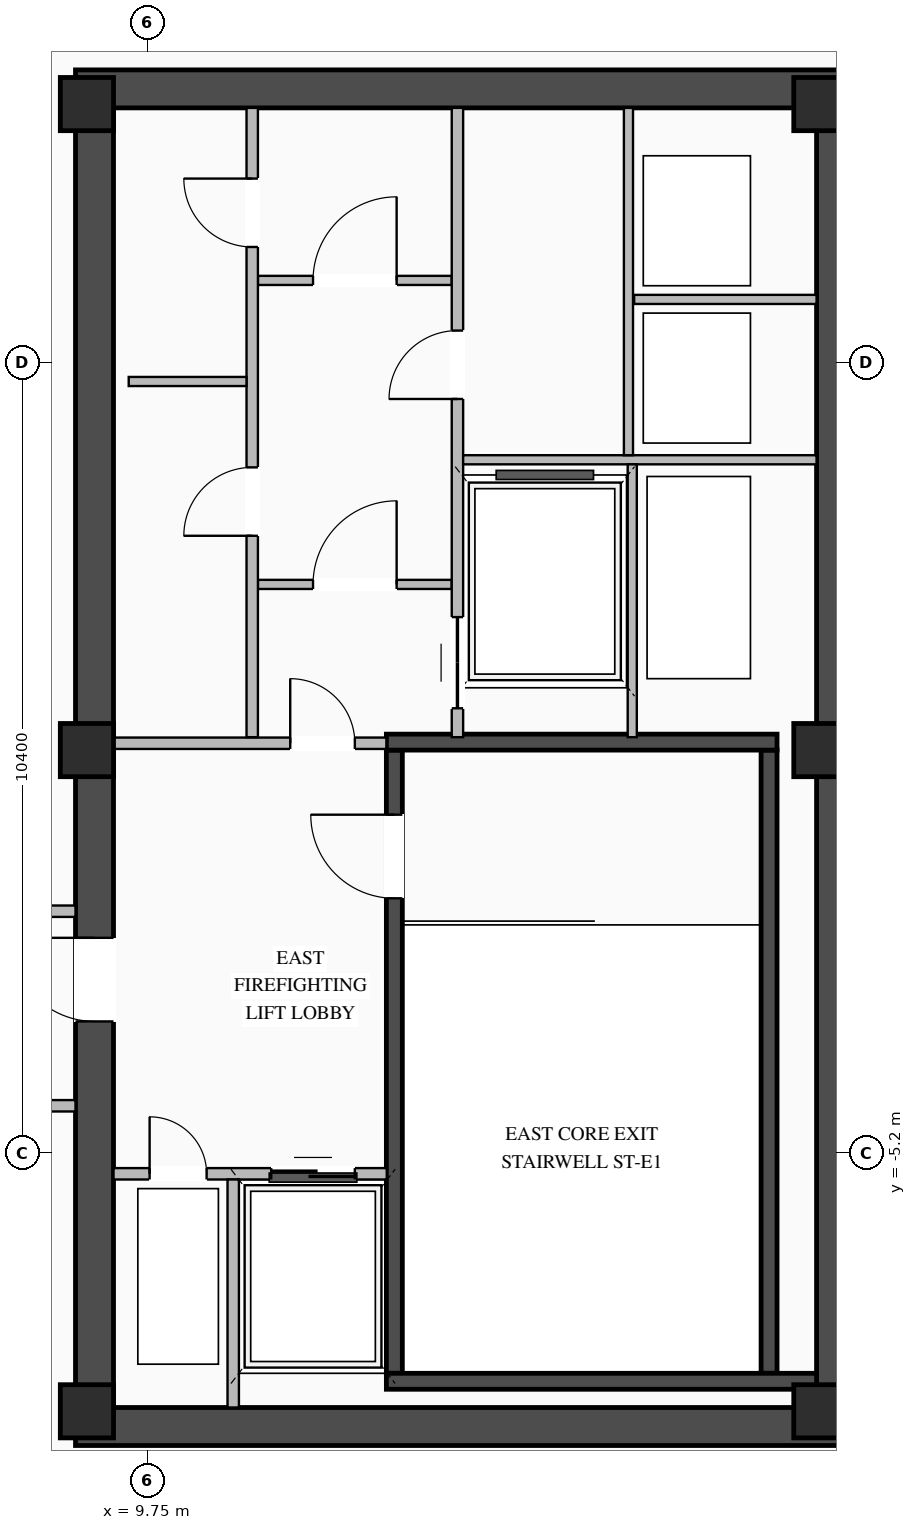
"""IFC4 building model, lengths in metres.
Left out: names, types, materials, properties, quantities, classifications, styles, units other than length and angle.
Written with IfcOpenShell. Run it as: python <this file> out.ifc"""

import sys

from ifc_helpers import new_model, si_unit, direction, frame, frame_2d, origin, origin_2d, place, context, subcontext, project, spatial, rectangle, extrude, element, fill, save


model = new_model("IFC4")
c1 = context("Model", 3, precision=1e-05, world=origin(), true_north=direction((0.0, 1.0)))
c2 = subcontext(c1, "Body", "Model", "MODEL_VIEW")
j1 = project(units=[si_unit("LENGTHUNIT", "METRE"), si_unit("PLANEANGLEUNIT", "RADIAN")], contexts=[c1])
p1 = place(None, origin())
s1 = spatial("IfcSite", under=j1, at=p1, CompositionType="ELEMENT")
p2 = place(p1, origin())
s2 = spatial("IfcBuilding", under=s1, at=p2, CompositionType="ELEMENT")
p3 = place(p2, frame((0.0, 0.0, 308.55)))
s3 = spatial("IfcBuildingStorey", under=s2, at=p3, CompositionType="ELEMENT", Elevation=308.55)
for number, where, z_axis, x_axis in (
    (1, (8.8, -8.8, 0.0), (0.0, 0.0, 1.0), (1.0, 0.0, 0.0)),
    (2, (8.8, 8.8, 0.0), (0.0, 0.0, 1.0), (1.0, 0.0, 0.0)),
):
    element("IfcWall", number, at=place(p3, frame(where, z_axis=z_axis, x_axis=x_axis)), inside=s3, PredefinedType="SHEAR", context=c2, shape_type="SweptSolid", body=[
        extrude(rectangle(XDim=10.25, YDim=0.5, at=frame_2d((5.125, 0.0))), origin(), (0.0, 0.0, 1.0), 3.71),
    ])
p4 = place(p3, frame((9.05, -8.55, 0.0), z_axis=(0.0, 0.0, 1.0), x_axis=(0.0, 1.0, 0.0)))
e3 = element("IfcWall", 3, at=p4, inside=s3, PredefinedType="SHEAR", context=c2, shape_type="SweptSolid", body=[
    extrude(rectangle(XDim=17.1, YDim=0.5, at=frame_2d((8.55, 0.0))), origin(), (0.0, 0.0, 1.0), 3.71),
])
p5 = place(p4, frame((5.08, 0.0, 0.0)))
e4 = element("IfcOpeningElement", 4, at=p5, cuts=e3, PredefinedType="OPENING", context=c2, shape_type="SweptSolid", body=[
    extrude(rectangle(XDim=1.1, YDim=2.08, at=frame_2d((0.55, 1.04))), frame((0.0, 0.26, 0.0), z_axis=(0.0, -1.0, 0.0), x_axis=(1.0, 0.0, 0.0)), (0.0, 0.0, 1.0), 0.52),
])
p6 = place(p3, frame((18.8, -8.55, 0.0), z_axis=(0.0, 0.0, 1.0), x_axis=(0.0, 1.0, 0.0)))
e5 = element("IfcWall", 5, at=p6, inside=s3, PredefinedType="SHEAR", context=c2, shape_type="SweptSolid", body=[
    extrude(rectangle(XDim=17.1, YDim=0.5, at=frame_2d((8.55, 0.0))), origin(), (0.0, 0.0, 1.0), 3.71),
])
p7 = place(p3, frame((12.995, -8.1, 0.0), z_axis=(0.0, 0.0, 1.0), x_axis=(0.0, 1.0, 0.0)))
e6 = element("IfcWall", 6, at=p7, inside=s3, PredefinedType="SHEAR", context=c2, shape_type="SweptSolid", body=[
    extrude(rectangle(XDim=8.2, YDim=0.21, at=frame_2d((4.1, 0.0))), origin(), (0.0, 0.0, 1.0), 3.71),
])
p8 = place(p7, frame((6.25, 0.0, 0.0)))
e7 = element("IfcOpeningElement", 7, at=p8, cuts=e6, PredefinedType="OPENING", context=c2, shape_type="SweptSolid", body=[
    extrude(rectangle(XDim=1.1, YDim=2.15, at=frame_2d((0.55, 1.075))), frame((0.0, 0.115, 0.0), z_axis=(0.0, -1.0, 0.0), x_axis=(1.0, 0.0, 0.0)), (0.0, 0.0, 1.0), 0.23),
])
p9 = place(p3, frame((17.925, -8.1, 0.0), z_axis=(0.0, 0.0, 1.0), x_axis=(0.0, 1.0, 0.0)))
e8 = element("IfcWall", 8, at=p9, inside=s3, PredefinedType="SHEAR", context=c2, shape_type="SweptSolid", body=[
    extrude(rectangle(XDim=8.2, YDim=0.21, at=frame_2d((4.1, 0.0))), origin(), (0.0, 0.0, 1.0), 3.71),
])
p10 = place(p3, frame((12.89, -8.205, 0.0), z_axis=(0.0, 0.0, 1.0), x_axis=(1.0, 0.0, 0.0)))
e9 = element("IfcWall", 9, at=p10, inside=s3, PredefinedType="SHEAR", context=c2, shape_type="SweptSolid", body=[
    extrude(rectangle(XDim=5.66, YDim=0.21, at=frame_2d((2.83, 0.0))), origin(), (0.0, 0.0, 1.0), 3.71),
])
p11 = place(p3, frame((18.03, 0.205, 0.0), z_axis=(0.0, 0.0, 1.0), x_axis=(-1.0, 0.0, 0.0)))
e10 = element("IfcWall", 10, at=p11, inside=s3, PredefinedType="SHEAR", context=c2, shape_type="SweptSolid", body=[
    extrude(rectangle(XDim=5.14, YDim=0.21, at=frame_2d((2.57, 0.0))), origin(), (0.0, 0.0, 1.0), 3.71),
])
for number, where, z_axis, x_axis in (
    (11, (8.95, -8.6, 0.0), (0.0, 0.0, 1.0), (1.0, 0.0, 0.0)),
    (12, (8.95, 0.1, 0.0), (0.0, 0.0, 1.0), (1.0, 0.0, 0.0)),
    (13, (8.95, 8.6, 0.0), (0.0, 0.0, 1.0), (1.0, 0.0, 0.0)),
    (14, (18.6, -8.6, 0.0), (0.0, 0.0, 1.0), (1.0, 0.0, 0.0)),
    (15, (18.6, 0.1, 0.0), (0.0, 0.0, 1.0), (1.0, 0.0, 0.0)),
    (16, (18.6, 8.6, 0.0), (0.0, 0.0, 1.0), (1.0, 0.0, 0.0)),
):
    element("IfcColumn", number, at=place(p3, frame(where, z_axis=z_axis, x_axis=x_axis)), inside=s3, PredefinedType="COLUMN", context=c2, shape_type="SweptSolid", body=[
        extrude(rectangle(XDim=0.7, YDim=0.7, at=origin_2d()), origin(), (0.0, 0.0, 1.0), 3.95),
    ])
p12 = place(p3, frame((9.3, -5.475, 0.0), z_axis=(0.0, 0.0, 1.0), x_axis=(1.0, 0.0, 0.0)))
e17 = element("IfcWall", 17, at=p12, inside=s3, PredefinedType="STANDARD", context=c2, shape_type="SweptSolid", body=[
    extrude(rectangle(XDim=3.595, YDim=0.15, at=frame_2d((1.797, 0.0))), origin(), (0.0, 0.0, 1.0), 3.69),
])
p13 = place(p12, frame((2.075, 0.0, 0.0)))
e18 = element("IfcOpeningElement", 18, at=p13, cuts=e17, PredefinedType="OPENING", context=c2, shape_type="SweptSolid", body=[
    extrude(rectangle(XDim=1.1, YDim=2.15, at=frame_2d((0.55, 1.075))), frame((0.0, 0.085, 0.0), z_axis=(0.0, -1.0, 0.0), x_axis=(1.0, 0.0, 0.0)), (0.0, 0.0, 1.0), 0.17),
])
p14 = place(p12, frame((0.475, 0.0, 0.0)))
e19 = element("IfcOpeningElement", 19, at=p14, cuts=e17, PredefinedType="OPENING", context=c2, shape_type="SweptSolid", body=[
    extrude(rectangle(XDim=0.75, YDim=2.05, at=frame_2d((0.375, 1.025))), frame((0.0, 0.085, 0.0), z_axis=(0.0, -1.0, 0.0), x_axis=(1.0, 0.0, 0.0)), (0.0, 0.0, 1.0), 0.17),
])
p15 = place(p3, frame((10.875, -8.55, 0.0), z_axis=(0.0, 0.0, 1.0), x_axis=(0.0, 1.0, 0.0)))
e20 = element("IfcWall", 20, at=p15, inside=s3, PredefinedType="STANDARD", context=c2, shape_type="SweptSolid", body=[
    extrude(rectangle(XDim=3.0, YDim=0.15, at=frame_2d((1.5, 0.0))), origin(), (0.0, 0.0, 1.0), 3.69),
])
p16 = place(p3, frame((9.3, 0.19, 0.0), z_axis=(0.0, 0.0, 1.0), x_axis=(1.0, 0.0, 0.0)))
e21 = element("IfcWall", 21, at=p16, inside=s3, PredefinedType="STANDARD", context=c2, shape_type="SweptSolid", body=[
    extrude(rectangle(XDim=3.59, YDim=0.15, at=frame_2d((1.795, 0.0))), origin(), (0.0, 0.0, 1.0), 3.185),
])
p17 = place(p16, frame((2.325, 0.0, 0.0)))
e22 = element("IfcOpeningElement", 22, at=p17, cuts=e21, PredefinedType="OPENING", context=c2, shape_type="SweptSolid", body=[
    extrude(rectangle(XDim=0.85, YDim=2.04, at=frame_2d((0.425, 1.02))), frame((0.0, 0.085, 0.0), z_axis=(0.0, -1.0, 0.0), x_axis=(1.0, 0.0, 0.0)), (0.0, 0.0, 1.0), 0.17),
])
p18 = place(p3, frame((11.2, 2.28, 0.0), z_axis=(0.0, 0.0, 1.0), x_axis=(1.0, 0.0, 0.0)))
e23 = element("IfcWall", 23, at=p18, inside=s3, PredefinedType="STANDARD", context=c2, shape_type="SweptSolid", body=[
    extrude(rectangle(XDim=2.55, YDim=0.12, at=frame_2d((1.275, 0.0))), origin(), (0.0, 0.0, 1.0), 3.69),
])
p19 = place(p18, frame((0.725, 0.0, 0.0)))
e24 = element("IfcOpeningElement", 24, at=p19, cuts=e23, PredefinedType="OPENING", context=c2, shape_type="SweptSolid", body=[
    extrude(rectangle(XDim=1.1, YDim=2.1, at=frame_2d((0.55, 1.05))), frame((0.0, 0.07, 0.0), z_axis=(0.0, -1.0, 0.0), x_axis=(1.0, 0.0, 0.0)), (0.0, 0.0, 1.0), 0.14),
])
p20 = place(p3, frame((11.2, 6.28, 0.0), z_axis=(0.0, 0.0, 1.0), x_axis=(1.0, 0.0, 0.0)))
e25 = element("IfcWall", 25, at=p20, inside=s3, PredefinedType="STANDARD", context=c2, shape_type="SweptSolid", body=[
    extrude(rectangle(XDim=2.55, YDim=0.12, at=frame_2d((1.275, 0.0))), origin(), (0.0, 0.0, 1.0), 3.69),
])
p21 = place(p20, frame((0.725, 0.0, 0.0)))
e26 = element("IfcOpeningElement", 26, at=p21, cuts=e25, PredefinedType="OPENING", context=c2, shape_type="SweptSolid", body=[
    extrude(rectangle(XDim=1.1, YDim=2.1, at=frame_2d((0.55, 1.05))), frame((0.0, 0.07, 0.0), z_axis=(0.0, -1.0, 0.0), x_axis=(1.0, 0.0, 0.0)), (0.0, 0.0, 1.0), 0.14),
])
p22 = place(p3, frame((11.125, 0.27, 0.0), z_axis=(0.0, 0.0, 1.0), x_axis=(0.0, 1.0, 0.0)))
e27 = element("IfcWall", 27, at=p22, inside=s3, PredefinedType="STANDARD", context=c2, shape_type="SweptSolid", body=[
    extrude(rectangle(XDim=8.28, YDim=0.15, at=frame_2d((4.14, 0.0))), origin(), (0.0, 0.0, 1.0), 3.69),
])
p23 = place(p22, frame((2.65, 0.0, 0.0)))
e28 = element("IfcOpeningElement", 28, at=p23, cuts=e27, PredefinedType="OPENING", context=c2, shape_type="SweptSolid", body=[
    extrude(rectangle(XDim=0.9, YDim=2.05, at=frame_2d((0.45, 1.025))), frame((0.0, 0.085, 0.0), z_axis=(0.0, -1.0, 0.0), x_axis=(1.0, 0.0, 0.0)), (0.0, 0.0, 1.0), 0.17),
])
p24 = place(p22, frame((6.45, 0.0, 0.0)))
e29 = element("IfcOpeningElement", 29, at=p24, cuts=e27, PredefinedType="OPENING", context=c2, shape_type="SweptSolid", body=[
    extrude(rectangle(XDim=0.9, YDim=2.05, at=frame_2d((0.45, 1.025))), frame((0.0, 0.085, 0.0), z_axis=(0.0, -1.0, 0.0), x_axis=(1.0, 0.0, 0.0)), (0.0, 0.0, 1.0), 0.17),
])
p25 = place(p3, frame((9.5, 4.95, 0.0), z_axis=(0.0, 0.0, 1.0), x_axis=(1.0, 0.0, 0.0)))
e30 = element("IfcWall", 30, at=p25, inside=s3, PredefinedType="STANDARD", context=c2, shape_type="SweptSolid", body=[
    extrude(rectangle(XDim=1.55, YDim=0.12, at=frame_2d((0.775, 0.0))), origin(), (0.0, 0.0, 1.0), 3.69),
])
p26 = place(p3, frame((13.825, 0.27, 0.0), z_axis=(0.0, 0.0, 1.0), x_axis=(0.0, 1.0, 0.0)))
e31 = element("IfcWall", 31, at=p26, inside=s3, PredefinedType="STANDARD", context=c2, shape_type="SweptSolid", body=[
    extrude(rectangle(XDim=8.28, YDim=0.15, at=frame_2d((4.14, 0.0))), origin(), (0.0, 0.0, 1.0), 3.69),
])
p27 = place(p26, frame((4.45, 0.0, 0.0)))
e32 = element("IfcOpeningElement", 32, at=p27, cuts=e31, PredefinedType="OPENING", context=c2, shape_type="SweptSolid", body=[
    extrude(rectangle(XDim=0.9, YDim=2.05, at=frame_2d((0.45, 1.025))), frame((0.0, 0.085, 0.0), z_axis=(0.0, -1.0, 0.0), x_axis=(1.0, 0.0, 0.0)), (0.0, 0.0, 1.0), 0.17),
])
p28 = place(p26, frame((0.38, 0.0, 0.0)))
e33 = element("IfcOpeningElement", 33, at=p28, cuts=e31, PredefinedType="OPENING", context=c2, shape_type="SweptSolid", body=[
    extrude(rectangle(XDim=1.2, YDim=2.1, at=frame_2d((0.6, 1.05))), frame((0.0, 0.085, 0.0), z_axis=(0.0, -1.0, 0.0), x_axis=(1.0, 0.0, 0.0)), (0.0, 0.0, 1.0), 0.17),
])
p29 = place(p3, frame((13.9, 3.92, 0.0), z_axis=(0.0, 0.0, 1.0), x_axis=(1.0, 0.0, 0.0)))
e34 = element("IfcWall", 34, at=p29, inside=s3, PredefinedType="STANDARD", context=c2, shape_type="SweptSolid", body=[
    extrude(rectangle(XDim=4.65, YDim=0.12, at=frame_2d((2.325, 0.0))), origin(), (0.0, 0.0, 1.0), 3.69),
])
p30 = place(p3, frame((16.15, 6.03, 0.0), z_axis=(0.0, 0.0, 1.0), x_axis=(1.0, 0.0, 0.0)))
e35 = element("IfcWall", 35, at=p30, inside=s3, PredefinedType="STANDARD", context=c2, shape_type="SweptSolid", body=[
    extrude(rectangle(XDim=2.4, YDim=0.12, at=frame_2d((1.2, 0.0))), origin(), (0.0, 0.0, 1.0), 3.69),
])
p31 = place(p3, frame((16.075, 3.98, 0.0), z_axis=(0.0, 0.0, 1.0), x_axis=(0.0, 1.0, 0.0)))
e36 = element("IfcWall", 36, at=p31, inside=s3, PredefinedType="STANDARD", context=c2, shape_type="SweptSolid", body=[
    extrude(rectangle(XDim=4.57, YDim=0.12, at=frame_2d((2.285, 0.0))), origin(), (0.0, 0.0, 1.0), 3.69),
])
p32 = place(p3, frame((16.125, 0.27, 0.0), z_axis=(0.0, 0.0, 1.0), x_axis=(0.0, 1.0, 0.0)))
e37 = element("IfcWall", 37, at=p32, inside=s3, PredefinedType="STANDARD", context=c2, shape_type="SweptSolid", body=[
    extrude(rectangle(XDim=3.59, YDim=0.12, at=frame_2d((1.795, 0.0))), origin(), (0.0, 0.0, 1.0), 3.69),
])
p33 = place(p3, frame((-8.8, -2.02, 0.0), z_axis=(0.0, 0.0, 1.0), x_axis=(1.0, 0.0, 0.0)))
e38 = element("IfcWall", 38, at=p33, inside=s3, PredefinedType="STANDARD", context=c2, shape_type="SweptSolid", body=[
    extrude(rectangle(XDim=17.6, YDim=0.15, at=frame_2d((8.8, 0.0))), origin(), (0.0, 0.0, 1.0), 3.69),
])
p34 = place(p33, frame((4.6, 0.0, 0.0)))
e39 = element("IfcOpeningElement", 39, at=p34, cuts=e38, PredefinedType="OPENING", context=c2, shape_type="SweptSolid", body=[
    extrude(rectangle(XDim=1.0, YDim=2.02, at=frame_2d((0.5, 1.01))), frame((0.0, 0.085, 0.0), z_axis=(0.0, -1.0, 0.0), x_axis=(1.0, 0.0, 0.0)), (0.0, 0.0, 1.0), 0.17),
])
p35 = place(p33, frame((13.4, 0.0, 0.0)))
e40 = element("IfcOpeningElement", 40, at=p35, cuts=e38, PredefinedType="OPENING", context=c2, shape_type="SweptSolid", body=[
    extrude(rectangle(XDim=1.0, YDim=2.02, at=frame_2d((0.5, 1.01))), frame((0.0, 0.085, 0.0), z_axis=(0.0, -1.0, 0.0), x_axis=(1.0, 0.0, 0.0)), (0.0, 0.0, 1.0), 0.17),
])
p36 = place(p3, frame((-8.8, -4.58, 0.0), z_axis=(0.0, 0.0, 1.0), x_axis=(1.0, 0.0, 0.0)))
e41 = element("IfcWall", 41, at=p36, inside=s3, PredefinedType="STANDARD", context=c2, shape_type="SweptSolid", body=[
    extrude(rectangle(XDim=17.6, YDim=0.15, at=frame_2d((8.8, 0.0))), origin(), (0.0, 0.0, 1.0), 3.69),
])
p37 = place(p36, frame((4.6, 0.0, 0.0)))
e42 = element("IfcOpeningElement", 42, at=p37, cuts=e41, PredefinedType="OPENING", context=c2, shape_type="SweptSolid", body=[
    extrude(rectangle(XDim=1.0, YDim=2.02, at=frame_2d((0.5, 1.01))), frame((0.0, 0.085, 0.0), z_axis=(0.0, -1.0, 0.0), x_axis=(1.0, 0.0, 0.0)), (0.0, 0.0, 1.0), 0.17),
])
p38 = place(p8, origin())
e43 = element("IfcDoor", 43, at=p38, inside=s3, OperationType="SINGLE_SWING_RIGHT", PredefinedType="DOOR", context=c2, shape_type="SweptSolid", body=[
    extrude(rectangle(XDim=1.1, YDim=2.15, at=frame_2d((0.55, 1.075))), frame((0.0, 0.025, 0.0), z_axis=(0.0, -1.0, 0.0), x_axis=(1.0, 0.0, 0.0)), (0.0, 0.0, 1.0), 0.05),
])
fill(e7, e43)
p39 = place(p13, origin())
e44 = element("IfcDoor", 44, at=p39, inside=s3, OperationType="DOUBLE_DOOR_SLIDING", PredefinedType="DOOR", context=c2, shape_type="SweptSolid", body=[
    extrude(rectangle(XDim=1.1, YDim=2.15, at=frame_2d((0.55, 1.075))), frame((0.0, 0.025, 0.0), z_axis=(0.0, -1.0, 0.0), x_axis=(1.0, 0.0, 0.0)), (0.0, 0.0, 1.0), 0.05),
])
fill(e18, e44)
p40 = place(p14, origin())
e45 = element("IfcDoor", 45, at=p40, inside=s3, OperationType="SINGLE_SWING_LEFT", PredefinedType="DOOR", context=c2, shape_type="SweptSolid", body=[
    extrude(rectangle(XDim=0.75, YDim=2.05, at=frame_2d((0.375, 1.025))), frame((0.0, 0.025, 0.0), z_axis=(0.0, -1.0, 0.0), x_axis=(1.0, 0.0, 0.0)), (0.0, 0.0, 1.0), 0.05),
])
fill(e19, e45)
p41 = place(p17, origin())
e46 = element("IfcDoor", 46, at=p41, inside=s3, OperationType="SINGLE_SWING_LEFT", PredefinedType="DOOR", context=c2, shape_type="SweptSolid", body=[
    extrude(rectangle(XDim=0.85, YDim=2.04, at=frame_2d((0.425, 1.02))), frame((0.0, 0.025, 0.0), z_axis=(0.0, -1.0, 0.0), x_axis=(1.0, 0.0, 0.0)), (0.0, 0.0, 1.0), 0.05),
])
fill(e22, e46)
p42 = place(p5, origin())
e47 = element("IfcDoor", 47, at=p42, inside=s3, OperationType="SINGLE_SWING_RIGHT", PredefinedType="DOOR", context=c2, shape_type="SweptSolid", body=[
    extrude(rectangle(XDim=1.1, YDim=2.08, at=frame_2d((0.55, 1.04))), frame((0.0, -0.155, 0.0), z_axis=(0.0, -1.0, 0.0), x_axis=(1.0, 0.0, 0.0)), (0.0, 0.0, 1.0), 0.05),
])
fill(e4, e47)
p43 = place(p19, origin())
e48 = element("IfcDoor", 48, at=p43, inside=s3, OperationType="SINGLE_SWING_RIGHT", PredefinedType="DOOR", context=c2, shape_type="SweptSolid", body=[
    extrude(rectangle(XDim=1.1, YDim=2.1, at=frame_2d((0.55, 1.05))), frame((0.0, 0.025, 0.0), z_axis=(0.0, -1.0, 0.0), x_axis=(1.0, 0.0, 0.0)), (0.0, 0.0, 1.0), 0.05),
])
fill(e24, e48)
p44 = place(p21, origin())
e49 = element("IfcDoor", 49, at=p44, inside=s3, OperationType="SINGLE_SWING_RIGHT", PredefinedType="DOOR", context=c2, shape_type="SweptSolid", body=[
    extrude(rectangle(XDim=1.1, YDim=2.1, at=frame_2d((0.55, 1.05))), frame((0.0, 0.025, 0.0), z_axis=(0.0, -1.0, 0.0), x_axis=(1.0, 0.0, 0.0)), (0.0, 0.0, 1.0), 0.05),
])
fill(e26, e49)
p45 = place(p23, origin())
e50 = element("IfcDoor", 50, at=p45, inside=s3, OperationType="SINGLE_SWING_LEFT", PredefinedType="DOOR", context=c2, shape_type="SweptSolid", body=[
    extrude(rectangle(XDim=0.9, YDim=2.05, at=frame_2d((0.45, 1.025))), frame((0.0, 0.025, 0.0), z_axis=(0.0, -1.0, 0.0), x_axis=(1.0, 0.0, 0.0)), (0.0, 0.0, 1.0), 0.05),
])
fill(e28, e50)
p46 = place(p24, origin())
e51 = element("IfcDoor", 51, at=p46, inside=s3, OperationType="SINGLE_SWING_RIGHT", PredefinedType="DOOR", context=c2, shape_type="SweptSolid", body=[
    extrude(rectangle(XDim=0.9, YDim=2.05, at=frame_2d((0.45, 1.025))), frame((0.0, 0.025, 0.0), z_axis=(0.0, -1.0, 0.0), x_axis=(1.0, 0.0, 0.0)), (0.0, 0.0, 1.0), 0.05),
])
fill(e29, e51)
p47 = place(p27, origin())
e52 = element("IfcDoor", 52, at=p47, inside=s3, OperationType="SINGLE_SWING_LEFT", PredefinedType="DOOR", context=c2, shape_type="SweptSolid", body=[
    extrude(rectangle(XDim=0.9, YDim=2.05, at=frame_2d((0.45, 1.025))), frame((0.0, 0.025, 0.0), z_axis=(0.0, -1.0, 0.0), x_axis=(1.0, 0.0, 0.0)), (0.0, 0.0, 1.0), 0.05),
])
fill(e32, e52)
p48 = place(p28, origin())
e53 = element("IfcDoor", 53, at=p48, inside=s3, OperationType="DOUBLE_DOOR_SLIDING", PredefinedType="DOOR", context=c2, shape_type="SweptSolid", body=[
    extrude(rectangle(XDim=1.2, YDim=2.1, at=frame_2d((0.6, 1.05))), frame((0.0, 0.025, 0.0), z_axis=(0.0, -1.0, 0.0), x_axis=(1.0, 0.0, 0.0)), (0.0, 0.0, 1.0), 0.05),
])
fill(e33, e53)
save(model, sys.argv[1])
